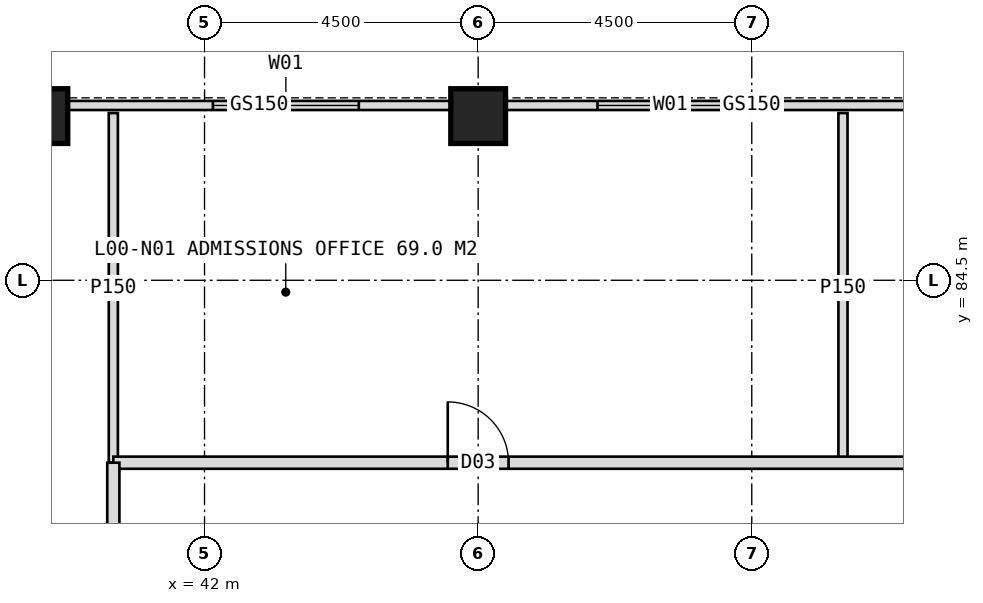
"""IFC4 building model, lengths in metres.
Left out: names, types, materials, properties, quantities, classifications, styles, units other than length and angle.
Written with IfcOpenShell. Run it as: python <this file> out.ifc"""

import sys

from ifc_helpers import new_model, si_unit, direction, frame, frame_2d, origin, origin_2d, place, context, subcontext, project, spatial, rectangle, hollow_rectangle, extrude, element, fill, save


model = new_model("IFC4")
c1 = context("Model", 3, precision=1e-05, world=origin(), true_north=direction((0.0, 1.0)))
c2 = subcontext(c1, "Body", "Model", "MODEL_VIEW")
j1 = project(units=[si_unit("LENGTHUNIT", "METRE"), si_unit("PLANEANGLEUNIT", "RADIAN")], contexts=[c1])
p1 = place(None, origin())
s1 = spatial("IfcSite", under=j1, at=p1, CompositionType="ELEMENT")
p2 = place(p1, origin())
s2 = spatial("IfcBuilding", under=s1, at=p2, CompositionType="ELEMENT")
p3 = place(p2, origin())
s3 = spatial("IfcBuildingStorey", under=s2, at=p3, CompositionType="ELEMENT", Elevation=0.0)
for number, where, z_axis, x_axis in (
    (1, (39.3, 87.2, 0.0), (0.0, 0.0, 1.0), (1.0, 0.0, 0.0)),
    (2, (46.5, 87.2, 0.0), (0.0, 0.0, 1.0), (1.0, 0.0, 0.0)),
):
    element("IfcColumn", number, at=place(p3, frame(where, z_axis=z_axis, x_axis=x_axis)), inside=s3, PredefinedType="COLUMN", context=c2, shape_type="SweptSolid", body=[
        extrude(hollow_rectangle(XDim=0.9, YDim=0.9, WallThickness=0.08, at=origin_2d()), origin(), (0.0, 0.0, 1.0), 6.0),
    ])
p4 = place(p3, frame((55.05, 87.375, 0.0), z_axis=(0.0, 0.0, 1.0), x_axis=(-1.0, 0.0, 0.0)))
e3 = element("IfcWall", 3, at=p4, inside=s3, PredefinedType="STANDARD", context=c2, shape_type="SweptSolid", body=[
    extrude(rectangle(XDim=8.1, YDim=0.15, at=frame_2d((4.05, 0.0))), origin(), (0.0, 0.0, 1.0), 5.1),
])
p5 = place(p4, frame((4.188, 0.0, 0.6)))
e4 = element("IfcOpeningElement", 4, at=p5, cuts=e3, PredefinedType="OPENING", context=c2, shape_type="SweptSolid", body=[
    extrude(rectangle(XDim=2.4, YDim=3.0, at=frame_2d((1.2, 1.5))), frame((0.0, 0.085, 0.0), z_axis=(0.0, -1.0, 0.0), x_axis=(1.0, 0.0, 0.0)), (0.0, 0.0, 1.0), 0.17),
])
p6 = place(p3, frame((46.05, 87.375, 0.0), z_axis=(0.0, 0.0, 1.0), x_axis=(-1.0, 0.0, 0.0)))
e5 = element("IfcWall", 5, at=p6, inside=s3, PredefinedType="STANDARD", context=c2, shape_type="SweptSolid", body=[
    extrude(rectangle(XDim=6.3, YDim=0.15, at=frame_2d((3.15, 0.0))), origin(), (0.0, 0.0, 1.0), 5.1),
])
p7 = place(p6, frame((1.512, 0.0, 0.6)))
e6 = element("IfcOpeningElement", 6, at=p7, cuts=e5, PredefinedType="OPENING", context=c2, shape_type="SweptSolid", body=[
    extrude(rectangle(XDim=2.4, YDim=3.0, at=frame_2d((1.2, 1.5))), frame((0.0, 0.085, 0.0), z_axis=(0.0, -1.0, 0.0), x_axis=(1.0, 0.0, 0.0)), (0.0, 0.0, 1.0), 0.17),
])
for number, where, z_axis, x_axis in (
    (7, (40.5, 81.5, 0.0), (0.0, 0.0, 1.0), (0.0, 1.0, 0.0)),
    (8, (52.5, 81.5, 0.0), (0.0, 0.0, 1.0), (0.0, 1.0, 0.0)),
):
    element("IfcWall", number, at=place(p3, frame(where, z_axis=z_axis, x_axis=x_axis)), inside=s3, PredefinedType="PARTITIONING", context=c2, shape_type="SweptSolid", body=[
        extrude(rectangle(XDim=5.75, YDim=0.15, at=frame_2d((2.875, 0.0))), origin(), (0.0, 0.0, 1.0), 5.7),
    ])
p8 = place(p3, frame((40.5, 81.5, 0.0), z_axis=(0.0, 0.0, 1.0), x_axis=(1.0, 0.0, 0.0)))
e9 = element("IfcWall", 9, at=p8, inside=s3, PredefinedType="PARTITIONING", context=c2, shape_type="SweptSolid", body=[
    extrude(rectangle(XDim=28.5, YDim=0.2, at=frame_2d((14.25, 0.0))), origin(), (0.0, 0.0, 1.0), 5.7),
])
p9 = place(p8, frame((5.5, 0.0, 0.0)))
e10 = element("IfcOpeningElement", 10, at=p9, cuts=e9, PredefinedType="OPENING", context=c2, shape_type="SweptSolid", body=[
    extrude(rectangle(XDim=1.0, YDim=2.1, at=frame_2d((0.5, 1.05))), frame((0.0, 0.11, 0.0), z_axis=(0.0, -1.0, 0.0), x_axis=(1.0, 0.0, 0.0)), (0.0, 0.0, 1.0), 0.22),
])
p10 = place(p8, frame((18.6, 0.0, 0.0)))
e11 = element("IfcOpeningElement", 11, at=p10, cuts=e9, PredefinedType="OPENING", context=c2, shape_type="SweptSolid", body=[
    extrude(rectangle(XDim=1.8, YDim=2.2, at=frame_2d((0.9, 1.1))), frame((0.0, 0.11, 0.0), z_axis=(0.0, -1.0, 0.0), x_axis=(1.0, 0.0, 0.0)), (0.0, 0.0, 1.0), 0.22),
])
p11 = place(p3, frame((40.5, 42.5, 0.0), z_axis=(0.0, 0.0, 1.0), x_axis=(0.0, 1.0, 0.0)))
e12 = element("IfcWall", 12, at=p11, inside=s3, PredefinedType="PARTITIONING", context=c2, shape_type="SweptSolid", body=[
    extrude(rectangle(XDim=39.0, YDim=0.2, at=frame_2d((19.5, 0.0))), origin(), (0.0, 0.0, 1.0), 5.7),
])
p12 = place(p11, frame((0.65, 0.0, 0.0)))
e13 = element("IfcOpeningElement", 13, at=p12, cuts=e12, PredefinedType="OPENING", context=c2, shape_type="SweptSolid", body=[
    extrude(rectangle(XDim=1.6, YDim=2.2, at=frame_2d((0.8, 1.1))), frame((0.0, 0.11, 0.0), z_axis=(0.0, -1.0, 0.0), x_axis=(1.0, 0.0, 0.0)), (0.0, 0.0, 1.0), 0.22),
])
p13 = place(p11, frame((10.4, 0.0, 0.0)))
e14 = element("IfcOpeningElement", 14, at=p13, cuts=e12, PredefinedType="OPENING", context=c2, shape_type="SweptSolid", body=[
    extrude(rectangle(XDim=1.6, YDim=2.2, at=frame_2d((0.8, 1.1))), frame((0.0, 0.11, 0.0), z_axis=(0.0, -1.0, 0.0), x_axis=(1.0, 0.0, 0.0)), (0.0, 0.0, 1.0), 0.22),
])
p14 = place(p11, frame((19.95, 0.0, 0.0)))
e15 = element("IfcOpeningElement", 15, at=p14, cuts=e12, PredefinedType="OPENING", context=c2, shape_type="SweptSolid", body=[
    extrude(rectangle(XDim=1.6, YDim=2.2, at=frame_2d((0.8, 1.1))), frame((0.0, 0.11, 0.0), z_axis=(0.0, -1.0, 0.0), x_axis=(1.0, 0.0, 0.0)), (0.0, 0.0, 1.0), 0.22),
])
p15 = place(p11, frame((29.7, 0.0, 0.0)))
e16 = element("IfcOpeningElement", 16, at=p15, cuts=e12, PredefinedType="OPENING", context=c2, shape_type="SweptSolid", body=[
    extrude(rectangle(XDim=1.6, YDim=2.2, at=frame_2d((0.8, 1.1))), frame((0.0, 0.11, 0.0), z_axis=(0.0, -1.0, 0.0), x_axis=(1.0, 0.0, 0.0)), (0.0, 0.0, 1.0), 0.22),
])
p16 = place(p5, origin())
e17 = element("IfcWindow", 17, at=p16, inside=s3, PartitioningType="SINGLE_PANEL", PredefinedType="WINDOW", context=c2, shape_type="SweptSolid", body=[
    extrude(rectangle(XDim=2.4, YDim=3.0, at=frame_2d((1.2, 1.5))), frame((0.0, 0.03, 0.0), z_axis=(0.0, -1.0, 0.0), x_axis=(1.0, 0.0, 0.0)), (0.0, 0.0, 1.0), 0.06),
])
fill(e4, e17)
p17 = place(p7, origin())
e18 = element("IfcWindow", 18, at=p17, inside=s3, PartitioningType="SINGLE_PANEL", PredefinedType="WINDOW", context=c2, shape_type="SweptSolid", body=[
    extrude(rectangle(XDim=2.4, YDim=3.0, at=frame_2d((1.2, 1.5))), frame((0.0, 0.03, 0.0), z_axis=(0.0, -1.0, 0.0), x_axis=(1.0, 0.0, 0.0)), (0.0, 0.0, 1.0), 0.06),
])
fill(e6, e18)
p18 = place(p9, origin())
e19 = element("IfcDoor", 19, at=p18, inside=s3, OperationType="SINGLE_SWING_LEFT", PredefinedType="DOOR", context=c2, shape_type="SweptSolid", body=[
    extrude(rectangle(XDim=1.0, YDim=2.1, at=frame_2d((0.5, 1.05))), frame((0.0, 0.025, 0.0), z_axis=(0.0, -1.0, 0.0), x_axis=(1.0, 0.0, 0.0)), (0.0, 0.0, 1.0), 0.05),
])
fill(e10, e19)
save(model, sys.argv[1])
